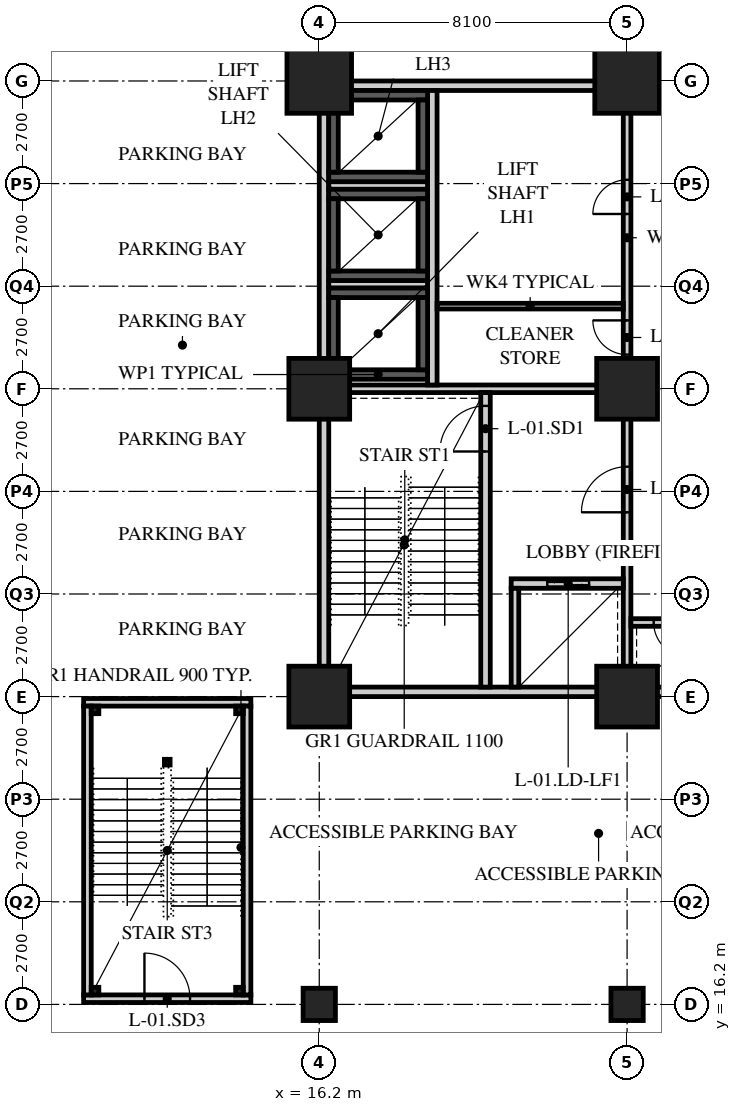
"""IFC4 building model, lengths in metres.
Left out: names, types, materials, properties, quantities, classifications, styles, units other than length and angle.
Written with IfcOpenShell. Run it as: python <this file> out.ifc"""

import sys

from ifc_helpers import new_model, si_unit, direction, frame, frame_2d, origin, origin_2d, place, context, subcontext, project, spatial, rectangle, hollow_rectangle, extrude, element, fill, save


model = new_model("IFC4")
c1 = context("Model", 3, precision=1e-05, world=origin(), true_north=direction((0.0, 1.0)))
c2 = subcontext(c1, "Body", "Model", "MODEL_VIEW")
j1 = project(units=[si_unit("LENGTHUNIT", "METRE"), si_unit("PLANEANGLEUNIT", "RADIAN")], contexts=[c1])
p1 = place(None, origin())
s1 = spatial("IfcSite", under=j1, at=p1, CompositionType="ELEMENT")
p2 = place(p1, origin())
s2 = spatial("IfcBuilding", under=s1, at=p2, CompositionType="ELEMENT")
p3 = place(p2, frame((0.0, 0.0, -4.2)))
s3 = spatial("IfcBuildingStorey", under=s2, at=p3, CompositionType="ELEMENT", Elevation=-4.2)
p4 = place(p3, frame((16.2, 16.2, 0.0), z_axis=(0.0, 0.0, 1.0), x_axis=(1.0, 0.0, 0.0)))
e1 = element("IfcColumn", 1, at=p4, inside=s3, PredefinedType="COLUMN", context=c2, shape_type="SweptSolid", body=[
    extrude(hollow_rectangle(XDim=0.85, YDim=0.85, WallThickness=0.085, at=origin_2d()), origin(), (0.0, 0.0, 1.0), 4.2),
])
for number, where, z_axis, x_axis in (
    (2, (16.2, 24.3, 0.0), (0.0, 0.0, 1.0), (1.0, 0.0, 0.0)),
    (3, (16.2, 32.4, 0.0), (0.0, 0.0, 1.0), (1.0, 0.0, 0.0)),
):
    element("IfcColumn", number, at=place(p3, frame(where, z_axis=z_axis, x_axis=x_axis)), inside=s3, PredefinedType="COLUMN", context=c2, shape_type="SweptSolid", body=[
        extrude(hollow_rectangle(XDim=1.6, YDim=1.6, WallThickness=0.15, at=origin_2d()), origin(), (0.0, 0.0, 1.0), 4.2),
    ])
p5 = place(p3, frame((16.2, 40.5, 0.0), z_axis=(0.0, 0.0, 1.0), x_axis=(1.0, 0.0, 0.0)))
e4 = element("IfcColumn", 4, at=p5, inside=s3, PredefinedType="COLUMN", context=c2, shape_type="SweptSolid", body=[
    extrude(hollow_rectangle(XDim=1.7, YDim=1.7, WallThickness=0.16, at=origin_2d()), origin(), (0.0, 0.0, 1.0), 4.2),
])
p6 = place(p3, frame((24.3, 16.2, 0.0), z_axis=(0.0, 0.0, 1.0), x_axis=(1.0, 0.0, 0.0)))
e5 = element("IfcColumn", 5, at=p6, inside=s3, PredefinedType="COLUMN", context=c2, shape_type="SweptSolid", body=[
    extrude(hollow_rectangle(XDim=0.85, YDim=0.85, WallThickness=0.085, at=origin_2d()), origin(), (0.0, 0.0, 1.0), 4.2),
])
for number, where, z_axis, x_axis in (
    (6, (24.3, 24.3, 0.0), (0.0, 0.0, 1.0), (1.0, 0.0, 0.0)),
    (7, (24.3, 32.4, 0.0), (0.0, 0.0, 1.0), (1.0, 0.0, 0.0)),
):
    element("IfcColumn", number, at=place(p3, frame(where, z_axis=z_axis, x_axis=x_axis)), inside=s3, PredefinedType="COLUMN", context=c2, shape_type="SweptSolid", body=[
        extrude(hollow_rectangle(XDim=1.6, YDim=1.6, WallThickness=0.15, at=origin_2d()), origin(), (0.0, 0.0, 1.0), 4.2),
    ])
p7 = place(p3, frame((24.3, 40.5, 0.0), z_axis=(0.0, 0.0, 1.0), x_axis=(1.0, 0.0, 0.0)))
e8 = element("IfcColumn", 8, at=p7, inside=s3, PredefinedType="COLUMN", context=c2, shape_type="SweptSolid", body=[
    extrude(hollow_rectangle(XDim=1.7, YDim=1.7, WallThickness=0.16, at=origin_2d()), origin(), (0.0, 0.0, 1.0), 4.2),
])
p8 = place(p3, frame((16.2, 24.425, 0.0), z_axis=(0.0, 0.0, 1.0), x_axis=(1.0, 0.0, 0.0)))
e9 = element("IfcWall", 9, at=p8, inside=s3, PredefinedType="SOLIDWALL", context=c2, shape_type="SweptSolid", body=[
    extrude(rectangle(XDim=24.3, YDim=0.25, at=frame_2d((12.15, 0.0))), origin(), (0.0, 0.0, 1.0), 3.3),
])
p9 = place(p8, frame((11.25, 0.0, 0.0)))
e10 = element("IfcOpeningElement", 10, at=p9, cuts=e9, PredefinedType="OPENING", context=c2, shape_type="SweptSolid", body=[
    extrude(rectangle(XDim=1.8, YDim=2.4, at=frame_2d((0.9, 1.2))), frame((0.0, 0.135, 0.0), z_axis=(0.0, -1.0, 0.0), x_axis=(1.0, 0.0, 0.0)), (0.0, 0.0, 1.0), 0.27),
])
p10 = place(p3, frame((16.2, 40.375, 0.0), z_axis=(0.0, 0.0, 1.0), x_axis=(1.0, 0.0, 0.0)))
e11 = element("IfcWall", 11, at=p10, inside=s3, PredefinedType="SOLIDWALL", context=c2, shape_type="SweptSolid", body=[
    extrude(rectangle(XDim=24.3, YDim=0.25, at=frame_2d((12.15, 0.0))), origin(), (0.0, 0.0, 1.0), 3.3),
])
p11 = place(p10, frame((11.25, 0.0, 0.0)))
e12 = element("IfcOpeningElement", 12, at=p11, cuts=e11, PredefinedType="OPENING", context=c2, shape_type="SweptSolid", body=[
    extrude(rectangle(XDim=1.8, YDim=2.4, at=frame_2d((0.9, 1.2))), frame((0.0, 0.135, 0.0), z_axis=(0.0, -1.0, 0.0), x_axis=(1.0, 0.0, 0.0)), (0.0, 0.0, 1.0), 0.27),
])
p12 = place(p3, frame((16.325, 24.55, 0.0), z_axis=(0.0, 0.0, 1.0), x_axis=(0.0, 1.0, 0.0)))
e13 = element("IfcWall", 13, at=p12, inside=s3, PredefinedType="SOLIDWALL", context=c2, shape_type="SweptSolid", body=[
    extrude(rectangle(XDim=15.7, YDim=0.25, at=frame_2d((7.85, 0.0))), origin(), (0.0, 0.0, 1.0), 3.338),
])
p13 = place(p3, frame((16.45, 32.4, 0.0), z_axis=(0.0, 0.0, 1.0), x_axis=(1.0, 0.0, 0.0)))
e14 = element("IfcWall", 14, at=p13, inside=s3, PredefinedType="SOLIDWALL", context=c2, shape_type="SweptSolid", body=[
    extrude(rectangle(XDim=7.95, YDim=0.2, at=frame_2d((3.975, 0.0))), origin(), (0.0, 0.0, 1.0), 3.25),
])
p14 = place(p3, frame((24.3, 24.55, 0.0), z_axis=(0.0, 0.0, 1.0), x_axis=(0.0, 1.0, 0.0)))
e15 = element("IfcWall", 15, at=p14, inside=s3, PredefinedType="SOLIDWALL", context=c2, shape_type="SweptSolid", body=[
    extrude(rectangle(XDim=7.75, YDim=0.2, at=frame_2d((3.875, 0.0))), origin(), (0.0, 0.0, 1.0), 3.25),
])
p15 = place(p14, frame((4.6, 0.0, 0.0)))
e16 = element("IfcOpeningElement", 16, at=p15, cuts=e15, PredefinedType="OPENING", context=c2, shape_type="SweptSolid", body=[
    extrude(rectangle(XDim=1.2, YDim=2.1, at=frame_2d((0.6, 1.05))), frame((0.0, 0.11, 0.0), z_axis=(0.0, -1.0, 0.0), x_axis=(1.0, 0.0, 0.0)), (0.0, 0.0, 1.0), 0.22),
])
p16 = place(p3, frame((20.575, 24.55, 0.0), z_axis=(0.0, 0.0, 1.0), x_axis=(0.0, 1.0, 0.0)))
e17 = element("IfcWall", 17, at=p16, inside=s3, PredefinedType="SOLIDWALL", context=c2, shape_type="SweptSolid", body=[
    extrude(rectangle(XDim=7.75, YDim=0.25, at=frame_2d((3.875, 0.0))), origin(), (0.0, 0.0, 1.0), 3.95),
])
p17 = place(p16, frame((6.2, 0.0, 0.0)))
e18 = element("IfcOpeningElement", 18, at=p17, cuts=e17, PredefinedType="OPENING", context=c2, shape_type="SweptSolid", body=[
    extrude(rectangle(XDim=1.2, YDim=2.1, at=frame_2d((0.6, 1.05))), frame((0.0, 0.135, 0.0), z_axis=(0.0, -1.0, 0.0), x_axis=(1.0, 0.0, 0.0)), (0.0, 0.0, 1.0), 0.27),
])
p18 = place(p3, frame((21.25, 27.275, 0.0), z_axis=(0.0, 0.0, 1.0), x_axis=(1.0, 0.0, 0.0)))
e19 = element("IfcWall", 19, at=p18, inside=s3, PredefinedType="SOLIDWALL", context=c2, shape_type="SweptSolid", body=[
    extrude(rectangle(XDim=2.95, YDim=0.25, at=frame_2d((1.475, 0.0))), origin(), (0.0, 0.0, 1.0), 3.95),
])
p19 = place(p18, frame((0.95, 0.0, 0.0)))
e20 = element("IfcOpeningElement", 20, at=p19, cuts=e19, PredefinedType="OPENING", context=c2, shape_type="SweptSolid", body=[
    extrude(rectangle(XDim=1.1, YDim=2.4, at=frame_2d((0.55, 1.2))), frame((0.0, 0.135, 0.0), z_axis=(0.0, -1.0, 0.0), x_axis=(1.0, 0.0, 0.0)), (0.0, 0.0, 1.0), 0.27),
])
p20 = place(p3, frame((21.35, 24.55, 0.0), z_axis=(0.0, 0.0, 1.0), x_axis=(0.0, 1.0, 0.0)))
e21 = element("IfcWall", 21, at=p20, inside=s3, PredefinedType="SOLIDWALL", context=c2, shape_type="SweptSolid", body=[
    extrude(rectangle(XDim=2.6, YDim=0.2, at=frame_2d((1.3, 0.0))), origin(), (0.0, 0.0, 1.0), 3.95),
])
p21 = place(p3, frame((19.175, 32.5, 0.0), z_axis=(0.0, 0.0, 1.0), x_axis=(0.0, 1.0, 0.0)))
e22 = element("IfcWall", 22, at=p21, inside=s3, PredefinedType="SOLIDWALL", context=c2, shape_type="SweptSolid", body=[
    extrude(rectangle(XDim=7.75, YDim=0.25, at=frame_2d((3.875, 0.0))), origin(), (0.0, 0.0, 1.0), 3.95),
])
for number, where, z_axis, x_axis in (
    (23, (16.45, 35.15, 0.0), (0.0, 0.0, 1.0), (1.0, 0.0, 0.0)),
    (24, (16.45, 37.75, 0.0), (0.0, 0.0, 1.0), (1.0, 0.0, 0.0)),
):
    element("IfcWall", number, at=place(p3, frame(where, z_axis=z_axis, x_axis=x_axis)), inside=s3, PredefinedType="SOLIDWALL", context=c2, shape_type="SweptSolid", body=[
        extrude(rectangle(XDim=2.6, YDim=0.2, at=frame_2d((1.3, 0.0))), origin(), (0.0, 0.0, 1.0), 3.95),
    ])
p22 = place(p3, frame((24.4, 26.25, 0.0), z_axis=(0.0, 0.0, 1.0), x_axis=(1.0, 0.0, 0.0)))
e25 = element("IfcWall", 25, at=p22, inside=s3, PredefinedType="SOLIDWALL", context=c2, shape_type="SweptSolid", body=[
    extrude(rectangle(XDim=2.15, YDim=0.2, at=frame_2d((1.075, 0.0))), origin(), (0.0, 0.0, 1.0), 3.95),
])
p23 = place(p22, frame((0.6, 0.0, 0.0)))
e26 = element("IfcOpeningElement", 26, at=p23, cuts=e25, PredefinedType="OPENING", context=c2, shape_type="SweptSolid", body=[
    extrude(rectangle(XDim=0.9, YDim=2.1, at=frame_2d((0.45, 1.05))), frame((0.0, 0.11, 0.0), z_axis=(0.0, -1.0, 0.0), x_axis=(1.0, 0.0, 0.0)), (0.0, 0.0, 1.0), 0.22),
])
p24 = place(p3, frame((24.3, 32.5, 0.0), z_axis=(0.0, 0.0, 1.0), x_axis=(0.0, 1.0, 0.0)))
e27 = element("IfcWall", 27, at=p24, inside=s3, PredefinedType="PARTITIONING", context=c2, shape_type="SweptSolid", body=[
    extrude(rectangle(XDim=7.75, YDim=0.2, at=frame_2d((3.875, 0.0))), origin(), (0.0, 0.0, 1.0), 3.25),
])
p25 = place(p24, frame((0.8, 0.0, 0.0)))
e28 = element("IfcOpeningElement", 28, at=p25, cuts=e27, PredefinedType="OPENING", context=c2, shape_type="SweptSolid", body=[
    extrude(rectangle(XDim=0.9, YDim=2.1, at=frame_2d((0.45, 1.05))), frame((0.0, 0.11, 0.0), z_axis=(0.0, -1.0, 0.0), x_axis=(1.0, 0.0, 0.0)), (0.0, 0.0, 1.0), 0.22),
])
p26 = place(p24, frame((4.5, 0.0, 0.0)))
e29 = element("IfcOpeningElement", 29, at=p26, cuts=e27, PredefinedType="OPENING", context=c2, shape_type="SweptSolid", body=[
    extrude(rectangle(XDim=0.9, YDim=2.1, at=frame_2d((0.45, 1.05))), frame((0.0, 0.11, 0.0), z_axis=(0.0, -1.0, 0.0), x_axis=(1.0, 0.0, 0.0)), (0.0, 0.0, 1.0), 0.22),
])
p27 = place(p3, frame((19.3, 34.575, 0.0), z_axis=(0.0, 0.0, 1.0), x_axis=(1.0, 0.0, 0.0)))
e30 = element("IfcWall", 30, at=p27, inside=s3, PredefinedType="PARTITIONING", context=c2, shape_type="SweptSolid", body=[
    extrude(rectangle(XDim=4.9, YDim=0.15, at=frame_2d((2.45, 0.0))), origin(), (0.0, 0.0, 1.0), 3.95),
])
p28 = place(p3, frame((10.0, 16.35, 0.0), z_axis=(0.0, 0.0, 1.0), x_axis=(1.0, 0.0, 0.0)))
e31 = element("IfcWall", 31, at=p28, inside=s3, PredefinedType="SOLIDWALL", context=c2, shape_type="SweptSolid", body=[
    extrude(rectangle(XDim=4.4, YDim=0.2, at=frame_2d((2.2, 0.0))), origin(), (0.0, 0.0, 1.0), 3.338),
])
p29 = place(p28, frame((1.6, 0.0, 0.0)))
e32 = element("IfcOpeningElement", 32, at=p29, cuts=e31, PredefinedType="OPENING", context=c2, shape_type="SweptSolid", body=[
    extrude(rectangle(XDim=1.2, YDim=2.1, at=frame_2d((0.6, 1.05))), frame((0.0, 0.11, 0.0), z_axis=(0.0, -1.0, 0.0), x_axis=(1.0, 0.0, 0.0)), (0.0, 0.0, 1.0), 0.22),
])
p30 = place(p3, frame((10.0, 24.15, 0.0), z_axis=(0.0, 0.0, 1.0), x_axis=(1.0, 0.0, 0.0)))
e33 = element("IfcWall", 33, at=p30, inside=s3, PredefinedType="SOLIDWALL", context=c2, shape_type="SweptSolid", body=[
    extrude(rectangle(XDim=4.4, YDim=0.2, at=frame_2d((2.2, 0.0))), origin(), (0.0, 0.0, 1.0), 3.338),
])
for number, where, z_axis, x_axis in (
    (34, (10.1, 16.45, 0.0), (0.0, 0.0, 1.0), (0.0, 1.0, 0.0)),
    (35, (14.3, 16.45, 0.0), (0.0, 0.0, 1.0), (0.0, 1.0, 0.0)),
):
    element("IfcWall", number, at=place(p3, frame(where, z_axis=z_axis, x_axis=x_axis)), inside=s3, PredefinedType="SOLIDWALL", context=c2, shape_type="SweptSolid", body=[
        extrude(rectangle(XDim=7.6, YDim=0.2, at=frame_2d((3.8, 0.0))), origin(), (0.0, 0.0, 1.0), 3.95),
    ])
for number, where, z_axis, x_axis in (
    (36, (10.3, 23.95, 0.0), (0.0, 0.0, 1.0), (1.0, 0.0, 0.0)),
    (37, (14.1, 23.95, 0.0), (0.0, 0.0, 1.0), (1.0, 0.0, 0.0)),
    (38, (10.3, 16.55, 0.0), (0.0, 0.0, 1.0), (1.0, 0.0, 0.0)),
    (39, (14.1, 16.55, 0.0), (0.0, 0.0, 1.0), (1.0, 0.0, 0.0)),
):
    element("IfcColumn", number, at=place(p3, frame(where, z_axis=z_axis, x_axis=x_axis)), inside=s3, PredefinedType="COLUMN", context=c2, shape_type="SweptSolid", body=[
        extrude(hollow_rectangle(XDim=0.2, YDim=0.2, WallThickness=0.012, at=origin_2d()), origin(), (0.0, 0.0, 1.0), 4.2),
    ])
p31 = place(p3, frame((12.2, 22.575, 0.0), z_axis=(0.0, 0.0, 1.0), x_axis=(1.0, 0.0, 0.0)))
e40 = element("IfcColumn", 40, at=p31, inside=s3, PredefinedType="COLUMN", context=c2, shape_type="SweptSolid", body=[
    extrude(hollow_rectangle(XDim=0.15, YDim=0.15, WallThickness=0.01, at=origin_2d()), origin(), (0.0, 0.0, 1.0), 4.2),
])
for number, where, z_axis, x_axis in (
    (41, (16.45, 32.775, 0.0), (0.0, 0.0, 1.0), (1.0, 0.0, 0.0)),
    (42, (16.45, 34.925, 0.0), (0.0, 0.0, 1.0), (1.0, 0.0, 0.0)),
):
    element("IfcWall", number, at=place(p3, frame(where, z_axis=z_axis, x_axis=x_axis)), inside=s3, PredefinedType="SOLIDWALL", context=c2, shape_type="SweptSolid", body=[
        extrude(rectangle(XDim=2.6, YDim=0.25, at=frame_2d((1.3, 0.0))), origin(), (0.0, 0.0, 1.0), 2.4),
    ])
for number, where, z_axis, x_axis in (
    (43, (16.575, 32.9, 0.0), (0.0, 0.0, 1.0), (0.0, 1.0, 0.0)),
    (44, (18.925, 32.9, 0.0), (0.0, 0.0, 1.0), (0.0, 1.0, 0.0)),
):
    element("IfcWall", number, at=place(p3, frame(where, z_axis=z_axis, x_axis=x_axis)), inside=s3, PredefinedType="SOLIDWALL", context=c2, shape_type="SweptSolid", body=[
        extrude(rectangle(XDim=1.9, YDim=0.25, at=frame_2d((0.95, 0.0))), origin(), (0.0, 0.0, 1.0), 2.4),
    ])
for number, where, z_axis, x_axis in (
    (45, (16.45, 35.375, 0.0), (0.0, 0.0, 1.0), (1.0, 0.0, 0.0)),
    (46, (16.45, 37.525, 0.0), (0.0, 0.0, 1.0), (1.0, 0.0, 0.0)),
):
    element("IfcWall", number, at=place(p3, frame(where, z_axis=z_axis, x_axis=x_axis)), inside=s3, PredefinedType="SOLIDWALL", context=c2, shape_type="SweptSolid", body=[
        extrude(rectangle(XDim=2.6, YDim=0.25, at=frame_2d((1.3, 0.0))), origin(), (0.0, 0.0, 1.0), 2.4),
    ])
for number, where, z_axis, x_axis in (
    (47, (16.575, 35.5, 0.0), (0.0, 0.0, 1.0), (0.0, 1.0, 0.0)),
    (48, (18.925, 35.5, 0.0), (0.0, 0.0, 1.0), (0.0, 1.0, 0.0)),
):
    element("IfcWall", number, at=place(p3, frame(where, z_axis=z_axis, x_axis=x_axis)), inside=s3, PredefinedType="SOLIDWALL", context=c2, shape_type="SweptSolid", body=[
        extrude(rectangle(XDim=1.9, YDim=0.25, at=frame_2d((0.95, 0.0))), origin(), (0.0, 0.0, 1.0), 2.4),
    ])
for number, where, z_axis, x_axis in (
    (49, (16.45, 37.975, 0.0), (0.0, 0.0, 1.0), (1.0, 0.0, 0.0)),
    (50, (16.45, 40.125, 0.0), (0.0, 0.0, 1.0), (1.0, 0.0, 0.0)),
):
    element("IfcWall", number, at=place(p3, frame(where, z_axis=z_axis, x_axis=x_axis)), inside=s3, PredefinedType="SOLIDWALL", context=c2, shape_type="SweptSolid", body=[
        extrude(rectangle(XDim=2.6, YDim=0.25, at=frame_2d((1.3, 0.0))), origin(), (0.0, 0.0, 1.0), 2.4),
    ])
for number, where, z_axis, x_axis in (
    (51, (16.575, 38.1, 0.0), (0.0, 0.0, 1.0), (0.0, 1.0, 0.0)),
    (52, (18.925, 38.1, 0.0), (0.0, 0.0, 1.0), (0.0, 1.0, 0.0)),
):
    element("IfcWall", number, at=place(p3, frame(where, z_axis=z_axis, x_axis=x_axis)), inside=s3, PredefinedType="SOLIDWALL", context=c2, shape_type="SweptSolid", body=[
        extrude(rectangle(XDim=1.9, YDim=0.25, at=frame_2d((0.95, 0.0))), origin(), (0.0, 0.0, 1.0), 2.4),
    ])
p32 = place(p25, origin())
e53 = element("IfcDoor", 53, at=p32, inside=s3, OperationType="SINGLE_SWING_RIGHT", PredefinedType="DOOR", context=c2, shape_type="SweptSolid", body=[
    extrude(rectangle(XDim=0.9, YDim=2.1, at=frame_2d((0.45, 1.05))), frame((0.0, 0.025, 0.0), z_axis=(0.0, -1.0, 0.0), x_axis=(1.0, 0.0, 0.0)), (0.0, 0.0, 1.0), 0.05),
])
fill(e28, e53)
p33 = place(p26, origin())
e54 = element("IfcDoor", 54, at=p33, inside=s3, OperationType="SINGLE_SWING_LEFT", PredefinedType="DOOR", context=c2, shape_type="SweptSolid", body=[
    extrude(rectangle(XDim=0.9, YDim=2.1, at=frame_2d((0.45, 1.05))), frame((0.0, 0.025, 0.0), z_axis=(0.0, -1.0, 0.0), x_axis=(1.0, 0.0, 0.0)), (0.0, 0.0, 1.0), 0.05),
])
fill(e29, e54)
p34 = place(p17, origin())
e55 = element("IfcDoor", 55, at=p34, inside=s3, OperationType="SINGLE_SWING_LEFT", PredefinedType="DOOR", context=c2, shape_type="SweptSolid", body=[
    extrude(rectangle(XDim=1.2, YDim=2.1, at=frame_2d((0.6, 1.05))), frame((0.0, 0.025, 0.0), z_axis=(0.0, -1.0, 0.0), x_axis=(1.0, 0.0, 0.0)), (0.0, 0.0, 1.0), 0.05),
])
fill(e18, e55)
p35 = place(p15, origin())
e56 = element("IfcDoor", 56, at=p35, inside=s3, OperationType="SINGLE_SWING_LEFT", PredefinedType="DOOR", context=c2, shape_type="SweptSolid", body=[
    extrude(rectangle(XDim=1.2, YDim=2.1, at=frame_2d((0.6, 1.05))), frame((0.0, 0.025, 0.0), z_axis=(0.0, -1.0, 0.0), x_axis=(1.0, 0.0, 0.0)), (0.0, 0.0, 1.0), 0.05),
])
fill(e16, e56)
p36 = place(p23, origin())
e57 = element("IfcDoor", 57, at=p36, inside=s3, OperationType="SINGLE_SWING_LEFT", PredefinedType="DOOR", context=c2, shape_type="SweptSolid", body=[
    extrude(rectangle(XDim=0.9, YDim=2.1, at=frame_2d((0.45, 1.05))), frame((0.0, 0.025, 0.0), z_axis=(0.0, -1.0, 0.0), x_axis=(1.0, 0.0, 0.0)), (0.0, 0.0, 1.0), 0.05),
])
fill(e26, e57)
p37 = place(p19, origin())
e58 = element("IfcDoor", 58, at=p37, inside=s3, OperationType="DOUBLE_DOOR_SLIDING", PredefinedType="DOOR", context=c2, shape_type="SweptSolid", body=[
    extrude(rectangle(XDim=1.1, YDim=2.4, at=frame_2d((0.55, 1.2))), frame((0.0, 0.025, 0.0), z_axis=(0.0, -1.0, 0.0), x_axis=(1.0, 0.0, 0.0)), (0.0, 0.0, 1.0), 0.05),
])
fill(e20, e58)
p38 = place(p29, origin())
e59 = element("IfcDoor", 59, at=p38, inside=s3, OperationType="SINGLE_SWING_LEFT", PredefinedType="DOOR", context=c2, shape_type="SweptSolid", body=[
    extrude(rectangle(XDim=1.2, YDim=2.1, at=frame_2d((0.6, 1.05))), frame((0.0, 0.025, 0.0), z_axis=(0.0, -1.0, 0.0), x_axis=(1.0, 0.0, 0.0)), (0.0, 0.0, 1.0), 0.05),
])
fill(e32, e59)
save(model, sys.argv[1])
